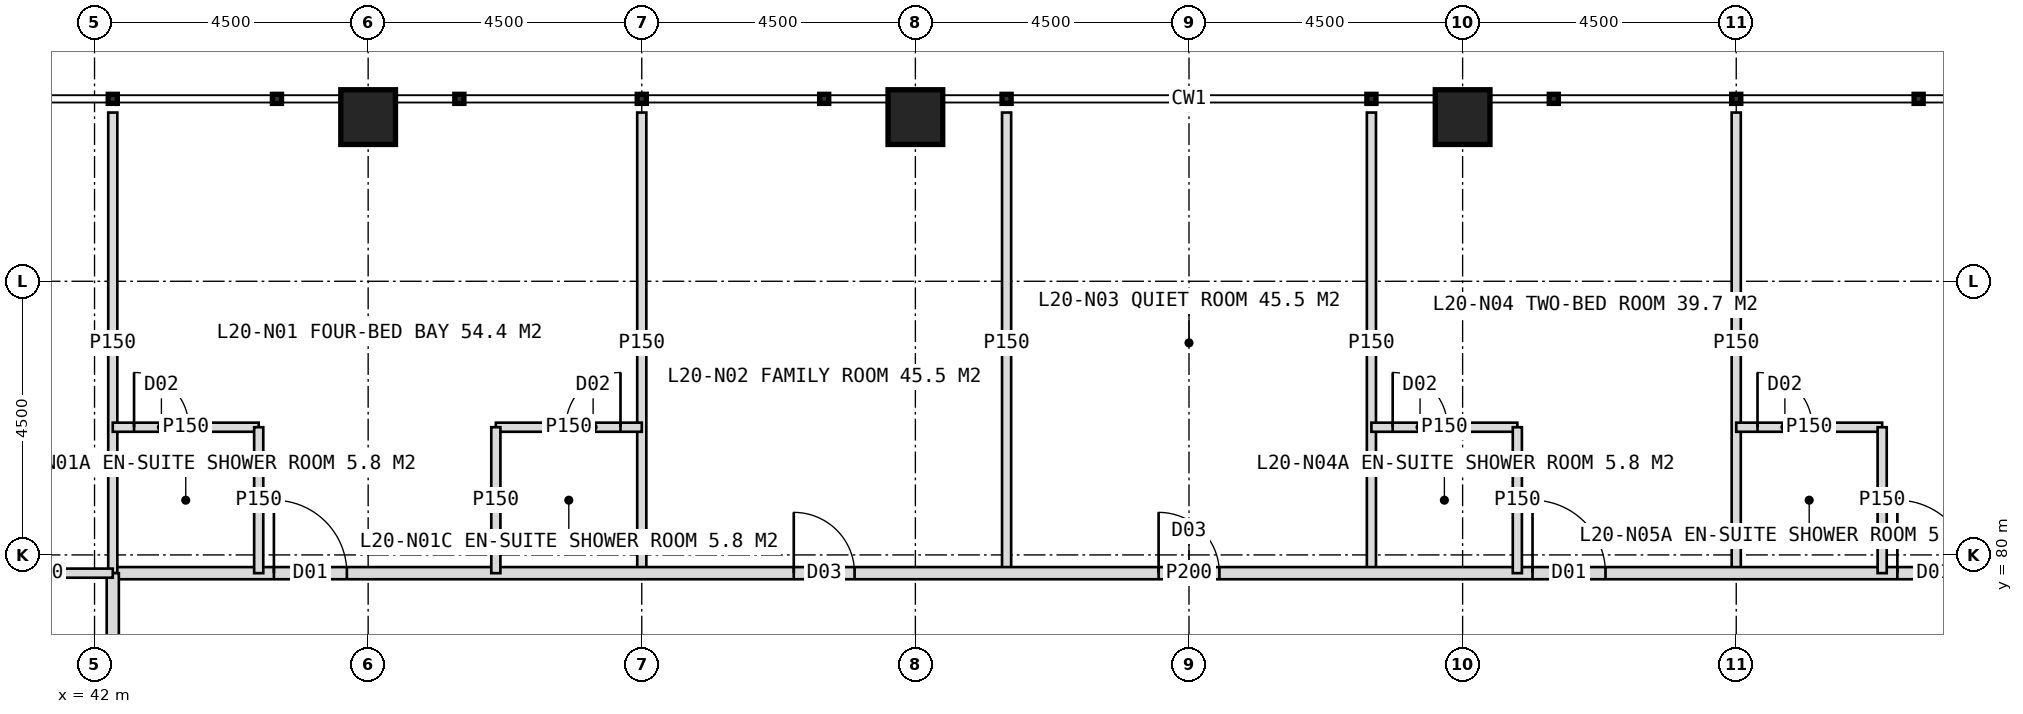
"""IFC4 building model, lengths in metres.
Left out: names, types, materials, properties, quantities, classifications, styles, units other than length and angle.
Written with IfcOpenShell. Run it as: python <this file> out.ifc"""

import sys

from ifc_helpers import new_model, si_unit, direction, frame, frame_2d, origin, origin_2d, place, context, subcontext, project, spatial, rectangle, hollow_rectangle, extrude, element, fill, save


model = new_model("IFC4")
c1 = context("Model", 3, precision=1e-05, world=origin(), true_north=direction((0.0, 1.0)))
c2 = subcontext(c1, "Body", "Model", "MODEL_VIEW")
j1 = project(units=[si_unit("LENGTHUNIT", "METRE"), si_unit("PLANEANGLEUNIT", "RADIAN")], contexts=[c1])
p1 = place(None, origin())
s1 = spatial("IfcSite", under=j1, at=p1, CompositionType="ELEMENT")
p2 = place(p1, origin())
s2 = spatial("IfcBuilding", under=s1, at=p2, CompositionType="ELEMENT")
p3 = place(p2, frame((0.0, 0.0, 87.0)))
s3 = spatial("IfcBuildingStorey", under=s2, at=p3, CompositionType="ELEMENT", Elevation=87.0)
for number, where, z_axis, x_axis in (
    (1, (46.5, 87.2, 0.0), (0.0, 0.0, 1.0), (1.0, 0.0, 0.0)),
    (2, (55.5, 87.2, 0.0), (0.0, 0.0, 1.0), (1.0, 0.0, 0.0)),
    (3, (64.5, 87.2, 0.0), (0.0, 0.0, 1.0), (1.0, 0.0, 0.0)),
):
    element("IfcColumn", number, at=place(p3, frame(where, z_axis=z_axis, x_axis=x_axis)), inside=s3, PredefinedType="COLUMN", context=c2, shape_type="SweptSolid", body=[
        extrude(hollow_rectangle(XDim=0.9, YDim=0.9, WallThickness=0.08, at=origin_2d()), origin(), (0.0, 0.0, 1.0), 4.0),
    ])
for number, where, z_axis, x_axis in (
    (4, (51.0, 79.7, 0.0), (0.0, 0.0, 1.0), (0.0, 1.0, 0.0)),
    (5, (57.0, 79.7, 0.0), (0.0, 0.0, 1.0), (0.0, 1.0, 0.0)),
    (6, (63.0, 79.7, 0.0), (0.0, 0.0, 1.0), (0.0, 1.0, 0.0)),
    (7, (69.0, 79.7, 0.0), (0.0, 0.0, 1.0), (0.0, 1.0, 0.0)),
):
    element("IfcWall", number, at=place(p3, frame(where, z_axis=z_axis, x_axis=x_axis)), inside=s3, PredefinedType="PARTITIONING", context=c2, shape_type="SweptSolid", body=[
        extrude(rectangle(XDim=7.575, YDim=0.15, at=frame_2d((3.788, 0.0))), origin(), (0.0, 0.0, 1.0), 3.75),
    ])
p4 = place(p3, frame((42.3, 79.7, 0.0), z_axis=(0.0, 0.0, 1.0), x_axis=(1.0, 0.0, 0.0)))
e8 = element("IfcWall", 8, at=p4, inside=s3, PredefinedType="PARTITIONING", context=c2, shape_type="SweptSolid", body=[
    extrude(rectangle(XDim=35.4, YDim=0.2, at=frame_2d((17.7, 0.0))), origin(), (0.0, 0.0, 1.0), 3.75),
])
p5 = place(p4, frame((2.65, 0.0, 0.0)))
e9 = element("IfcOpeningElement", 9, at=p5, cuts=e8, PredefinedType="OPENING", context=c2, shape_type="SweptSolid", body=[
    extrude(rectangle(XDim=1.2, YDim=2.2, at=frame_2d((0.6, 1.1))), frame((0.0, 0.11, 0.0), z_axis=(0.0, -1.0, 0.0), x_axis=(1.0, 0.0, 0.0)), (0.0, 0.0, 1.0), 0.22),
])
p6 = place(p4, frame((11.2, 0.0, 0.0)))
e10 = element("IfcOpeningElement", 10, at=p6, cuts=e8, PredefinedType="OPENING", context=c2, shape_type="SweptSolid", body=[
    extrude(rectangle(XDim=1.0, YDim=2.1, at=frame_2d((0.5, 1.05))), frame((0.0, 0.11, 0.0), z_axis=(0.0, -1.0, 0.0), x_axis=(1.0, 0.0, 0.0)), (0.0, 0.0, 1.0), 0.22),
])
p7 = place(p4, frame((17.2, 0.0, 0.0)))
e11 = element("IfcOpeningElement", 11, at=p7, cuts=e8, PredefinedType="OPENING", context=c2, shape_type="SweptSolid", body=[
    extrude(rectangle(XDim=1.0, YDim=2.1, at=frame_2d((0.5, 1.05))), frame((0.0, 0.11, 0.0), z_axis=(0.0, -1.0, 0.0), x_axis=(1.0, 0.0, 0.0)), (0.0, 0.0, 1.0), 0.22),
])
p8 = place(p4, frame((23.35, 0.0, 0.0)))
e12 = element("IfcOpeningElement", 12, at=p8, cuts=e8, PredefinedType="OPENING", context=c2, shape_type="SweptSolid", body=[
    extrude(rectangle(XDim=1.2, YDim=2.2, at=frame_2d((0.6, 1.1))), frame((0.0, 0.11, 0.0), z_axis=(0.0, -1.0, 0.0), x_axis=(1.0, 0.0, 0.0)), (0.0, 0.0, 1.0), 0.22),
])
p9 = place(p4, frame((29.35, 0.0, 0.0)))
e13 = element("IfcOpeningElement", 13, at=p9, cuts=e8, PredefinedType="OPENING", context=c2, shape_type="SweptSolid", body=[
    extrude(rectangle(XDim=1.2, YDim=2.2, at=frame_2d((0.6, 1.1))), frame((0.0, 0.11, 0.0), z_axis=(0.0, -1.0, 0.0), x_axis=(1.0, 0.0, 0.0)), (0.0, 0.0, 1.0), 0.22),
])
p10 = place(p3, frame((42.3, 79.7, 0.0), z_axis=(0.0, 0.0, 1.0), x_axis=(0.0, 1.0, 0.0)))
e14 = element("IfcWall", 14, at=p10, inside=s3, PredefinedType="PARTITIONING", context=c2, shape_type="SweptSolid", body=[
    extrude(rectangle(XDim=7.575, YDim=0.15, at=frame_2d((3.788, 0.0))), origin(), (0.0, 0.0, 1.0), 3.75),
])
p11 = place(p3, frame((42.3, 82.1, 0.0), z_axis=(0.0, 0.0, 1.0), x_axis=(1.0, 0.0, 0.0)))
e15 = element("IfcWall", 15, at=p11, inside=s3, PredefinedType="PARTITIONING", context=c2, shape_type="SweptSolid", body=[
    extrude(rectangle(XDim=2.4, YDim=0.15, at=frame_2d((1.2, 0.0))), origin(), (0.0, 0.0, 1.0), 3.75),
])
p12 = place(p11, frame((0.35, 0.0, 0.0)))
e16 = element("IfcOpeningElement", 16, at=p12, cuts=e15, PredefinedType="OPENING", context=c2, shape_type="SweptSolid", body=[
    extrude(rectangle(XDim=0.9, YDim=2.1, at=frame_2d((0.45, 1.05))), frame((0.0, 0.085, 0.0), z_axis=(0.0, -1.0, 0.0), x_axis=(1.0, 0.0, 0.0)), (0.0, 0.0, 1.0), 0.17),
])
p13 = place(p3, frame((44.7, 79.7, 0.0), z_axis=(0.0, 0.0, 1.0), x_axis=(0.0, 1.0, 0.0)))
e17 = element("IfcWall", 17, at=p13, inside=s3, PredefinedType="PARTITIONING", context=c2, shape_type="SweptSolid", body=[
    extrude(rectangle(XDim=2.4, YDim=0.15, at=frame_2d((1.2, 0.0))), origin(), (0.0, 0.0, 1.0), 3.75),
])
p14 = place(p3, frame((48.6, 82.1, 0.0), z_axis=(0.0, 0.0, 1.0), x_axis=(1.0, 0.0, 0.0)))
e18 = element("IfcWall", 18, at=p14, inside=s3, PredefinedType="PARTITIONING", context=c2, shape_type="SweptSolid", body=[
    extrude(rectangle(XDim=2.4, YDim=0.15, at=frame_2d((1.2, 0.0))), origin(), (0.0, 0.0, 1.0), 3.75),
])
p15 = place(p14, frame((1.15, 0.0, 0.0)))
e19 = element("IfcOpeningElement", 19, at=p15, cuts=e18, PredefinedType="OPENING", context=c2, shape_type="SweptSolid", body=[
    extrude(rectangle(XDim=0.9, YDim=2.1, at=frame_2d((0.45, 1.05))), frame((0.0, 0.085, 0.0), z_axis=(0.0, -1.0, 0.0), x_axis=(1.0, 0.0, 0.0)), (0.0, 0.0, 1.0), 0.17),
])
p16 = place(p3, frame((48.6, 79.7, 0.0), z_axis=(0.0, 0.0, 1.0), x_axis=(0.0, 1.0, 0.0)))
e20 = element("IfcWall", 20, at=p16, inside=s3, PredefinedType="PARTITIONING", context=c2, shape_type="SweptSolid", body=[
    extrude(rectangle(XDim=2.4, YDim=0.15, at=frame_2d((1.2, 0.0))), origin(), (0.0, 0.0, 1.0), 3.75),
])
p17 = place(p3, frame((63.0, 82.1, 0.0), z_axis=(0.0, 0.0, 1.0), x_axis=(1.0, 0.0, 0.0)))
e21 = element("IfcWall", 21, at=p17, inside=s3, PredefinedType="PARTITIONING", context=c2, shape_type="SweptSolid", body=[
    extrude(rectangle(XDim=2.4, YDim=0.15, at=frame_2d((1.2, 0.0))), origin(), (0.0, 0.0, 1.0), 3.75),
])
p18 = place(p17, frame((0.35, 0.0, 0.0)))
e22 = element("IfcOpeningElement", 22, at=p18, cuts=e21, PredefinedType="OPENING", context=c2, shape_type="SweptSolid", body=[
    extrude(rectangle(XDim=0.9, YDim=2.1, at=frame_2d((0.45, 1.05))), frame((0.0, 0.085, 0.0), z_axis=(0.0, -1.0, 0.0), x_axis=(1.0, 0.0, 0.0)), (0.0, 0.0, 1.0), 0.17),
])
p19 = place(p3, frame((65.4, 79.7, 0.0), z_axis=(0.0, 0.0, 1.0), x_axis=(0.0, 1.0, 0.0)))
e23 = element("IfcWall", 23, at=p19, inside=s3, PredefinedType="PARTITIONING", context=c2, shape_type="SweptSolid", body=[
    extrude(rectangle(XDim=2.4, YDim=0.15, at=frame_2d((1.2, 0.0))), origin(), (0.0, 0.0, 1.0), 3.75),
])
p20 = place(p3, frame((69.0, 82.1, 0.0), z_axis=(0.0, 0.0, 1.0), x_axis=(1.0, 0.0, 0.0)))
e24 = element("IfcWall", 24, at=p20, inside=s3, PredefinedType="PARTITIONING", context=c2, shape_type="SweptSolid", body=[
    extrude(rectangle(XDim=2.4, YDim=0.15, at=frame_2d((1.2, 0.0))), origin(), (0.0, 0.0, 1.0), 3.75),
])
p21 = place(p20, frame((0.35, 0.0, 0.0)))
e25 = element("IfcOpeningElement", 25, at=p21, cuts=e24, PredefinedType="OPENING", context=c2, shape_type="SweptSolid", body=[
    extrude(rectangle(XDim=0.9, YDim=2.1, at=frame_2d((0.45, 1.05))), frame((0.0, 0.085, 0.0), z_axis=(0.0, -1.0, 0.0), x_axis=(1.0, 0.0, 0.0)), (0.0, 0.0, 1.0), 0.17),
])
p22 = place(p3, frame((71.4, 79.7, 0.0), z_axis=(0.0, 0.0, 1.0), x_axis=(0.0, 1.0, 0.0)))
e26 = element("IfcWall", 26, at=p22, inside=s3, PredefinedType="PARTITIONING", context=c2, shape_type="SweptSolid", body=[
    extrude(rectangle(XDim=2.4, YDim=0.15, at=frame_2d((1.2, 0.0))), origin(), (0.0, 0.0, 1.0), 3.75),
])
p23 = place(p3, frame((42.3, 44.3, 0.0), z_axis=(0.0, 0.0, 1.0), x_axis=(0.0, 1.0, 0.0)))
e27 = element("IfcWall", 27, at=p23, inside=s3, PredefinedType="PARTITIONING", context=c2, shape_type="SweptSolid", body=[
    extrude(rectangle(XDim=35.4, YDim=0.2, at=frame_2d((17.7, 0.0))), origin(), (0.0, 0.0, 1.0), 3.75),
])
p24 = place(p23, frame((2.65, 0.0, 0.0)))
e28 = element("IfcOpeningElement", 28, at=p24, cuts=e27, PredefinedType="OPENING", context=c2, shape_type="SweptSolid", body=[
    extrude(rectangle(XDim=1.2, YDim=2.2, at=frame_2d((0.6, 1.1))), frame((0.0, 0.11, 0.0), z_axis=(0.0, -1.0, 0.0), x_axis=(1.0, 0.0, 0.0)), (0.0, 0.0, 1.0), 0.22),
])
p25 = place(p23, frame((11.35, 0.0, 0.0)))
e29 = element("IfcOpeningElement", 29, at=p25, cuts=e27, PredefinedType="OPENING", context=c2, shape_type="SweptSolid", body=[
    extrude(rectangle(XDim=1.2, YDim=2.2, at=frame_2d((0.6, 1.1))), frame((0.0, 0.11, 0.0), z_axis=(0.0, -1.0, 0.0), x_axis=(1.0, 0.0, 0.0)), (0.0, 0.0, 1.0), 0.22),
])
p26 = place(p23, frame((20.35, 0.0, 0.0)))
e30 = element("IfcOpeningElement", 30, at=p26, cuts=e27, PredefinedType="OPENING", context=c2, shape_type="SweptSolid", body=[
    extrude(rectangle(XDim=1.2, YDim=2.2, at=frame_2d((0.6, 1.1))), frame((0.0, 0.11, 0.0), z_axis=(0.0, -1.0, 0.0), x_axis=(1.0, 0.0, 0.0)), (0.0, 0.0, 1.0), 0.22),
])
p27 = place(p23, frame((26.35, 0.0, 0.0)))
e31 = element("IfcOpeningElement", 31, at=p27, cuts=e27, PredefinedType="OPENING", context=c2, shape_type="SweptSolid", body=[
    extrude(rectangle(XDim=1.2, YDim=2.2, at=frame_2d((0.6, 1.1))), frame((0.0, 0.11, 0.0), z_axis=(0.0, -1.0, 0.0), x_axis=(1.0, 0.0, 0.0)), (0.0, 0.0, 1.0), 0.22),
])
p28 = place(p23, frame((30.85, 0.0, 0.0)))
e32 = element("IfcOpeningElement", 32, at=p28, cuts=e27, PredefinedType="OPENING", context=c2, shape_type="SweptSolid", body=[
    extrude(rectangle(XDim=1.2, YDim=2.2, at=frame_2d((0.6, 1.1))), frame((0.0, 0.11, 0.0), z_axis=(0.0, -1.0, 0.0), x_axis=(1.0, 0.0, 0.0)), (0.0, 0.0, 1.0), 0.22),
])
p29 = place(p3, frame((42.3, 79.7, 0.0), z_axis=(0.0, 0.0, 1.0), x_axis=(-1.0, 0.0, 0.0)))
e33 = element("IfcWall", 33, at=p29, inside=s3, PredefinedType="PARTITIONING", context=c2, shape_type="SweptSolid", body=[
    extrude(rectangle(XDim=2.4, YDim=0.15, at=frame_2d((1.2, 0.0))), origin(), (0.0, 0.0, 1.0), 3.75),
])
p30 = place(p5, origin())
e34 = element("IfcDoor", 34, at=p30, inside=s3, OperationType="SINGLE_SWING_LEFT", PredefinedType="DOOR", context=c2, shape_type="SweptSolid", body=[
    extrude(rectangle(XDim=1.2, YDim=2.2, at=frame_2d((0.6, 1.1))), frame((0.0, 0.025, 0.0), z_axis=(0.0, -1.0, 0.0), x_axis=(1.0, 0.0, 0.0)), (0.0, 0.0, 1.0), 0.05),
])
fill(e9, e34)
p31 = place(p12, origin())
e35 = element("IfcDoor", 35, at=p31, inside=s3, OperationType="SINGLE_SWING_LEFT", PredefinedType="DOOR", context=c2, shape_type="SweptSolid", body=[
    extrude(rectangle(XDim=0.9, YDim=2.1, at=frame_2d((0.45, 1.05))), frame((0.0, 0.025, 0.0), z_axis=(0.0, -1.0, 0.0), x_axis=(1.0, 0.0, 0.0)), (0.0, 0.0, 1.0), 0.05),
])
fill(e16, e35)
p32 = place(p15, origin())
e36 = element("IfcDoor", 36, at=p32, inside=s3, OperationType="SINGLE_SWING_RIGHT", PredefinedType="DOOR", context=c2, shape_type="SweptSolid", body=[
    extrude(rectangle(XDim=0.9, YDim=2.1, at=frame_2d((0.45, 1.05))), frame((0.0, 0.025, 0.0), z_axis=(0.0, -1.0, 0.0), x_axis=(1.0, 0.0, 0.0)), (0.0, 0.0, 1.0), 0.05),
])
fill(e19, e36)
p33 = place(p6, origin())
e37 = element("IfcDoor", 37, at=p33, inside=s3, OperationType="SINGLE_SWING_LEFT", PredefinedType="DOOR", context=c2, shape_type="SweptSolid", body=[
    extrude(rectangle(XDim=1.0, YDim=2.1, at=frame_2d((0.5, 1.05))), frame((0.0, 0.025, 0.0), z_axis=(0.0, -1.0, 0.0), x_axis=(1.0, 0.0, 0.0)), (0.0, 0.0, 1.0), 0.05),
])
fill(e10, e37)
p34 = place(p7, origin())
e38 = element("IfcDoor", 38, at=p34, inside=s3, OperationType="SINGLE_SWING_LEFT", PredefinedType="DOOR", context=c2, shape_type="SweptSolid", body=[
    extrude(rectangle(XDim=1.0, YDim=2.1, at=frame_2d((0.5, 1.05))), frame((0.0, 0.025, 0.0), z_axis=(0.0, -1.0, 0.0), x_axis=(1.0, 0.0, 0.0)), (0.0, 0.0, 1.0), 0.05),
])
fill(e11, e38)
p35 = place(p8, origin())
e39 = element("IfcDoor", 39, at=p35, inside=s3, OperationType="SINGLE_SWING_LEFT", PredefinedType="DOOR", context=c2, shape_type="SweptSolid", body=[
    extrude(rectangle(XDim=1.2, YDim=2.2, at=frame_2d((0.6, 1.1))), frame((0.0, 0.025, 0.0), z_axis=(0.0, -1.0, 0.0), x_axis=(1.0, 0.0, 0.0)), (0.0, 0.0, 1.0), 0.05),
])
fill(e12, e39)
p36 = place(p18, origin())
e40 = element("IfcDoor", 40, at=p36, inside=s3, OperationType="SINGLE_SWING_LEFT", PredefinedType="DOOR", context=c2, shape_type="SweptSolid", body=[
    extrude(rectangle(XDim=0.9, YDim=2.1, at=frame_2d((0.45, 1.05))), frame((0.0, 0.025, 0.0), z_axis=(0.0, -1.0, 0.0), x_axis=(1.0, 0.0, 0.0)), (0.0, 0.0, 1.0), 0.05),
])
fill(e22, e40)
p37 = place(p9, origin())
e41 = element("IfcDoor", 41, at=p37, inside=s3, OperationType="SINGLE_SWING_LEFT", PredefinedType="DOOR", context=c2, shape_type="SweptSolid", body=[
    extrude(rectangle(XDim=1.2, YDim=2.2, at=frame_2d((0.6, 1.1))), frame((0.0, 0.025, 0.0), z_axis=(0.0, -1.0, 0.0), x_axis=(1.0, 0.0, 0.0)), (0.0, 0.0, 1.0), 0.05),
])
fill(e13, e41)
p38 = place(p21, origin())
e42 = element("IfcDoor", 42, at=p38, inside=s3, OperationType="SINGLE_SWING_LEFT", PredefinedType="DOOR", context=c2, shape_type="SweptSolid", body=[
    extrude(rectangle(XDim=0.9, YDim=2.1, at=frame_2d((0.45, 1.05))), frame((0.0, 0.025, 0.0), z_axis=(0.0, -1.0, 0.0), x_axis=(1.0, 0.0, 0.0)), (0.0, 0.0, 1.0), 0.05),
])
fill(e25, e42)
save(model, sys.argv[1])
